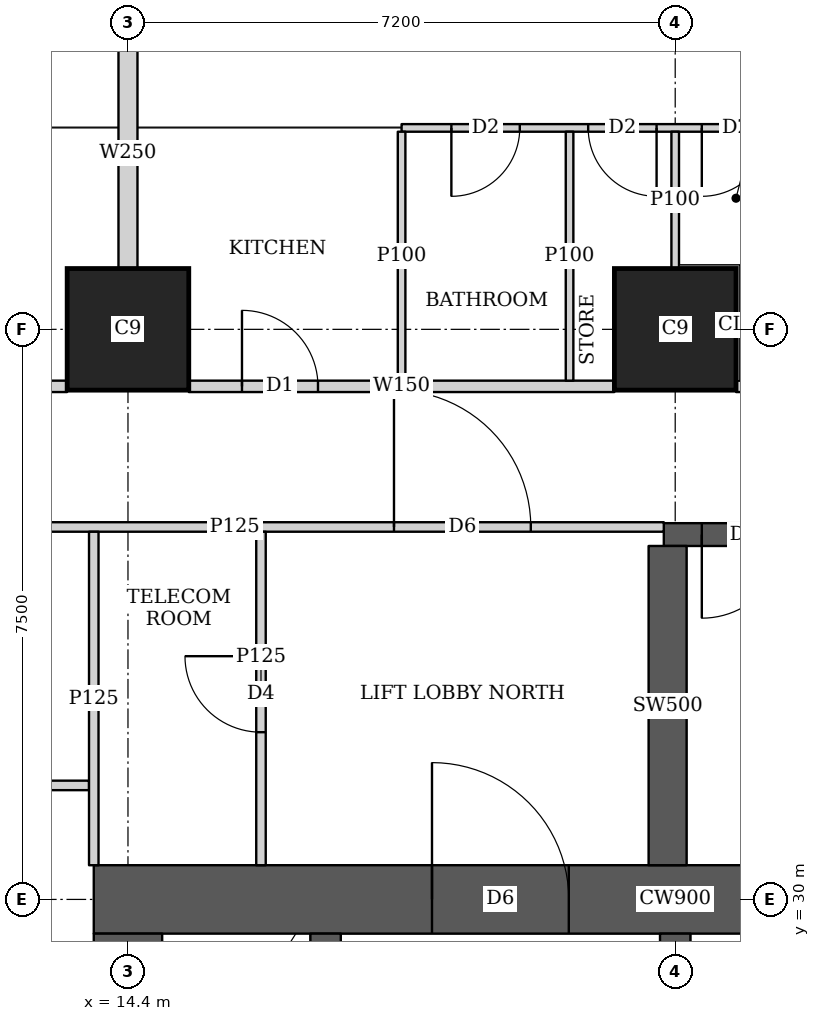
"""IFC4 building model, lengths in metres.
Left out: names, types, materials, properties, quantities, classifications, styles, units other than length and angle.
Written with IfcOpenShell. Run it as: python <this file> out.ifc"""

import sys

from ifc_helpers import new_model, si_unit, direction, frame, frame_2d, origin, origin_2d, place, context, subcontext, project, spatial, rectangle, extrude, element, fill, save


model = new_model("IFC4")
c1 = context("Model", 3, precision=1e-05, world=origin(), true_north=direction((0.0, 1.0)))
c2 = subcontext(c1, "Body", "Model", "MODEL_VIEW")
j1 = project(units=[si_unit("LENGTHUNIT", "METRE"), si_unit("PLANEANGLEUNIT", "RADIAN")], contexts=[c1])
p1 = place(None, origin())
s1 = spatial("IfcSite", under=j1, at=p1, CompositionType="ELEMENT")
p2 = place(p1, origin())
s2 = spatial("IfcBuilding", under=s1, at=p2, CompositionType="ELEMENT")
p3 = place(p2, frame((0.0, 0.0, 81.65)))
s3 = spatial("IfcBuildingStorey", under=s2, at=p3, CompositionType="ELEMENT", Elevation=81.65)
for number, where, z_axis, x_axis in (
    (1, (14.4, 37.5, 0.0), (0.0, 0.0, 1.0), (1.0, 0.0, 0.0)),
    (2, (21.6, 37.5, 0.0), (0.0, 0.0, 1.0), (1.0, 0.0, 0.0)),
):
    element("IfcColumn", number, at=place(p3, frame(where, z_axis=z_axis, x_axis=x_axis)), inside=s3, PredefinedType="COLUMN", context=c2, shape_type="SweptSolid", body=[
        extrude(rectangle(XDim=1.6, YDim=1.6, at=origin_2d()), origin(), (0.0, 0.0, 1.0), 3.75),
    ])
p4 = place(p3, frame((13.95, 30.0, 0.0), z_axis=(0.0, 0.0, 1.0), x_axis=(1.0, 0.0, 0.0)))
e3 = element("IfcWall", 3, at=p4, inside=s3, PredefinedType="SHEAR", context=c2, shape_type="SweptSolid", body=[
    extrude(rectangle(XDim=15.3, YDim=0.9, at=frame_2d((7.65, 0.0))), origin(), (0.0, 0.0, 1.0), 3.75),
])
p5 = place(p4, frame((4.45, 0.0, 0.0)))
e4 = element("IfcOpeningElement", 4, at=p5, cuts=e3, PredefinedType="OPENING", context=c2, shape_type="SweptSolid", body=[
    extrude(rectangle(XDim=1.8, YDim=2.1, at=frame_2d((0.9, 1.05))), frame((0.0, 0.46, 0.0), z_axis=(0.0, -1.0, 0.0), x_axis=(1.0, 0.0, 0.0)), (0.0, 0.0, 1.0), 0.92),
])
p6 = place(p4, frame((10.7, 0.0, 0.0)))
e5 = element("IfcOpeningElement", 5, at=p6, cuts=e3, PredefinedType="OPENING", context=c2, shape_type="SweptSolid", body=[
    extrude(rectangle(XDim=1.1, YDim=2.1, at=frame_2d((0.55, 1.05))), frame((0.0, 0.46, 0.0), z_axis=(0.0, -1.0, 0.0), x_axis=(1.0, 0.0, 0.0)), (0.0, 0.0, 1.0), 0.92),
])
p7 = place(p3, frame((14.4, 15.45, 0.0), z_axis=(0.0, 0.0, 1.0), x_axis=(0.0, 1.0, 0.0)))
e6 = element("IfcWall", 6, at=p7, inside=s3, PredefinedType="SHEAR", context=c2, shape_type="SweptSolid", body=[
    extrude(rectangle(XDim=14.1, YDim=0.9, at=frame_2d((7.05, 0.0))), origin(), (0.0, 0.0, 1.0), 3.75),
])
p8 = place(p3, frame((17.0, 15.45, 0.0), z_axis=(0.0, 0.0, 1.0), x_axis=(0.0, 1.0, 0.0)))
e7 = element("IfcWall", 7, at=p8, inside=s3, PredefinedType="SHEAR", context=c2, shape_type="SweptSolid", body=[
    extrude(rectangle(XDim=14.1, YDim=0.4, at=frame_2d((7.05, 0.0))), origin(), (0.0, 0.0, 1.0), 3.75),
])
p9 = place(p8, frame((0.875, 0.0, 0.0)))
e8 = element("IfcOpeningElement", 8, at=p9, cuts=e7, PredefinedType="OPENING", context=c2, shape_type="SweptSolid", body=[
    extrude(rectangle(XDim=1.1, YDim=2.1, at=frame_2d((0.55, 1.05))), frame((0.0, 0.21, 0.0), z_axis=(0.0, -1.0, 0.0), x_axis=(1.0, 0.0, 0.0)), (0.0, 0.0, 1.0), 0.42),
])
p10 = place(p8, frame((4.625, 0.0, 0.0)))
e9 = element("IfcOpeningElement", 9, at=p10, cuts=e7, PredefinedType="OPENING", context=c2, shape_type="SweptSolid", body=[
    extrude(rectangle(XDim=1.1, YDim=2.1, at=frame_2d((0.55, 1.05))), frame((0.0, 0.21, 0.0), z_axis=(0.0, -1.0, 0.0), x_axis=(1.0, 0.0, 0.0)), (0.0, 0.0, 1.0), 0.42),
])
p11 = place(p8, frame((8.375, 0.0, 0.0)))
e10 = element("IfcOpeningElement", 10, at=p11, cuts=e7, PredefinedType="OPENING", context=c2, shape_type="SweptSolid", body=[
    extrude(rectangle(XDim=1.1, YDim=2.1, at=frame_2d((0.55, 1.05))), frame((0.0, 0.21, 0.0), z_axis=(0.0, -1.0, 0.0), x_axis=(1.0, 0.0, 0.0)), (0.0, 0.0, 1.0), 0.42),
])
p12 = place(p8, frame((12.125, 0.0, 0.0)))
e11 = element("IfcOpeningElement", 11, at=p12, cuts=e7, PredefinedType="OPENING", context=c2, shape_type="SweptSolid", body=[
    extrude(rectangle(XDim=1.1, YDim=2.1, at=frame_2d((0.55, 1.05))), frame((0.0, 0.21, 0.0), z_axis=(0.0, -1.0, 0.0), x_axis=(1.0, 0.0, 0.0)), (0.0, 0.0, 1.0), 0.42),
])
p13 = place(p3, frame((21.6, 15.45, 0.0), z_axis=(0.0, 0.0, 1.0), x_axis=(0.0, 1.0, 0.0)))
e12 = element("IfcWall", 12, at=p13, inside=s3, PredefinedType="SHEAR", context=c2, shape_type="SweptSolid", body=[
    extrude(rectangle(XDim=14.1, YDim=0.4, at=frame_2d((7.05, 0.0))), origin(), (0.0, 0.0, 1.0), 3.75),
])
p14 = place(p3, frame((21.45, 34.8, 0.0), z_axis=(0.0, 0.0, 1.0), x_axis=(1.0, 0.0, 0.0)))
e13 = element("IfcWall", 13, at=p14, inside=s3, PredefinedType="SHEAR", context=c2, shape_type="SweptSolid", body=[
    extrude(rectangle(XDim=7.5, YDim=0.3, at=frame_2d((3.75, 0.0))), origin(), (0.0, 0.0, 1.0), 3.75),
])
p15 = place(p14, frame((0.5, 0.0, 0.0)))
e14 = element("IfcOpeningElement", 14, at=p15, cuts=e13, PredefinedType="OPENING", context=c2, shape_type="SweptSolid", body=[
    extrude(rectangle(XDim=1.1, YDim=2.1, at=frame_2d((0.55, 1.05))), frame((0.0, 0.16, 0.0), z_axis=(0.0, -1.0, 0.0), x_axis=(1.0, 0.0, 0.0)), (0.0, 0.0, 1.0), 0.32),
])
p16 = place(p3, frame((21.5, 30.45, 0.0), z_axis=(0.0, 0.0, 1.0), x_axis=(0.0, 1.0, 0.0)))
e15 = element("IfcWall", 15, at=p16, inside=s3, PredefinedType="SHEAR", context=c2, shape_type="SweptSolid", body=[
    extrude(rectangle(XDim=4.2, YDim=0.5, at=frame_2d((2.1, 0.0))), origin(), (0.0, 0.0, 1.0), 3.75),
])
p17 = place(p3, frame((8.1, 36.75, 0.0), z_axis=(0.0, 0.0, 1.0), x_axis=(1.0, 0.0, 0.0)))
e16 = element("IfcWall", 16, at=p17, inside=s3, PredefinedType="SOLIDWALL", context=c2, shape_type="SweptSolid", body=[
    extrude(rectangle(XDim=5.499, YDim=0.15, at=frame_2d((2.75, 0.0))), origin(), (0.0, 0.0, 1.0), 3.5),
])
p18 = place(p17, frame((3.739, 0.0, 0.0)))
e17 = element("IfcOpeningElement", 17, at=p18, cuts=e16, PredefinedType="OPENING", context=c2, shape_type="SweptSolid", body=[
    extrude(rectangle(XDim=1.0, YDim=2.1, at=frame_2d((0.5, 1.05))), frame((0.0, 0.085, 0.0), z_axis=(0.0, -1.0, 0.0), x_axis=(1.0, 0.0, 0.0)), (0.0, 0.0, 1.0), 0.17),
])
p19 = place(p3, frame((15.201, 36.75, 0.0), z_axis=(0.0, 0.0, 1.0), x_axis=(1.0, 0.0, 0.0)))
e18 = element("IfcWall", 18, at=p19, inside=s3, PredefinedType="SOLIDWALL", context=c2, shape_type="SweptSolid", body=[
    extrude(rectangle(XDim=5.598, YDim=0.15, at=frame_2d((2.799, 0.0))), origin(), (0.0, 0.0, 1.0), 3.5),
])
p20 = place(p19, frame((0.699, 0.0, 0.0)))
e19 = element("IfcOpeningElement", 19, at=p20, cuts=e18, PredefinedType="OPENING", context=c2, shape_type="SweptSolid", body=[
    extrude(rectangle(XDim=1.0, YDim=2.1, at=frame_2d((0.5, 1.05))), frame((0.0, 0.085, 0.0), z_axis=(0.0, -1.0, 0.0), x_axis=(1.0, 0.0, 0.0)), (0.0, 0.0, 1.0), 0.17),
])
p21 = place(p3, frame((22.401, 36.75, 0.0), z_axis=(0.0, 0.0, 1.0), x_axis=(1.0, 0.0, 0.0)))
e20 = element("IfcWall", 20, at=p21, inside=s3, PredefinedType="SOLIDWALL", context=c2, shape_type="SweptSolid", body=[
    extrude(rectangle(XDim=5.598, YDim=0.15, at=frame_2d((2.799, 0.0))), origin(), (0.0, 0.0, 1.0), 3.5),
])
p22 = place(p3, frame((18.0, 40.15, 0.0), z_axis=(0.0, 0.0, 1.0), x_axis=(1.0, 0.0, 0.0)))
e21 = element("IfcWall", 21, at=p22, inside=s3, PredefinedType="PARTITIONING", context=c2, shape_type="SweptSolid", body=[
    extrude(rectangle(XDim=10.675, YDim=0.1, at=frame_2d((5.337, 0.0))), origin(), (0.0, 0.0, 1.0), 3.5),
])
p23 = place(p22, frame((0.655, 0.0, 0.0)))
e22 = element("IfcOpeningElement", 22, at=p23, cuts=e21, PredefinedType="OPENING", context=c2, shape_type="SweptSolid", body=[
    extrude(rectangle(XDim=0.9, YDim=2.1, at=frame_2d((0.45, 1.05))), frame((0.0, 0.06, 0.0), z_axis=(0.0, -1.0, 0.0), x_axis=(1.0, 0.0, 0.0)), (0.0, 0.0, 1.0), 0.12),
])
p24 = place(p22, frame((3.95, 0.0, 0.0)))
e23 = element("IfcOpeningElement", 23, at=p24, cuts=e21, PredefinedType="OPENING", context=c2, shape_type="SweptSolid", body=[
    extrude(rectangle(XDim=0.9, YDim=2.1, at=frame_2d((0.45, 1.05))), frame((0.0, 0.06, 0.0), z_axis=(0.0, -1.0, 0.0), x_axis=(1.0, 0.0, 0.0)), (0.0, 0.0, 1.0), 0.12),
])
p25 = place(p22, frame((7.66, 0.0, 0.0)))
e24 = element("IfcOpeningElement", 24, at=p25, cuts=e21, PredefinedType="OPENING", context=c2, shape_type="SweptSolid", body=[
    extrude(rectangle(XDim=0.9, YDim=2.1, at=frame_2d((0.45, 1.05))), frame((0.0, 0.06, 0.0), z_axis=(0.0, -1.0, 0.0), x_axis=(1.0, 0.0, 0.0)), (0.0, 0.0, 1.0), 0.12),
])
p26 = place(p22, frame((2.455, 0.0, 0.0)))
e25 = element("IfcOpeningElement", 25, at=p26, cuts=e21, PredefinedType="OPENING", context=c2, shape_type="SweptSolid", body=[
    extrude(rectangle(XDim=0.9, YDim=2.1, at=frame_2d((0.45, 1.05))), frame((0.0, 0.06, 0.0), z_axis=(0.0, -1.0, 0.0), x_axis=(1.0, 0.0, 0.0)), (0.0, 0.0, 1.0), 0.12),
])
p27 = place(p22, frame((5.75, 0.0, 0.0)))
e26 = element("IfcOpeningElement", 26, at=p27, cuts=e21, PredefinedType="OPENING", context=c2, shape_type="SweptSolid", body=[
    extrude(rectangle(XDim=0.9, YDim=2.1, at=frame_2d((0.45, 1.05))), frame((0.0, 0.06, 0.0), z_axis=(0.0, -1.0, 0.0), x_axis=(1.0, 0.0, 0.0)), (0.0, 0.0, 1.0), 0.12),
])
p28 = place(p22, frame((9.46, 0.0, 0.0)))
e27 = element("IfcOpeningElement", 27, at=p28, cuts=e21, PredefinedType="OPENING", context=c2, shape_type="SweptSolid", body=[
    extrude(rectangle(XDim=0.9, YDim=2.1, at=frame_2d((0.45, 1.05))), frame((0.0, 0.06, 0.0), z_axis=(0.0, -1.0, 0.0), x_axis=(1.0, 0.0, 0.0)), (0.0, 0.0, 1.0), 0.12),
])
p29 = place(p3, frame((18.0, 36.825, 0.0), z_axis=(0.0, 0.0, 1.0), x_axis=(0.0, 1.0, 0.0)))
e28 = element("IfcWall", 28, at=p29, inside=s3, PredefinedType="PARTITIONING", context=c2, shape_type="SweptSolid", body=[
    extrude(rectangle(XDim=3.275, YDim=0.1, at=frame_2d((1.638, 0.0))), origin(), (0.0, 0.0, 1.0), 3.5),
])
p30 = place(p3, frame((21.6, 38.301, 0.0), z_axis=(0.0, 0.0, 1.0), x_axis=(0.0, 1.0, 0.0)))
e29 = element("IfcWall", 29, at=p30, inside=s3, PredefinedType="PARTITIONING", context=c2, shape_type="SweptSolid", body=[
    extrude(rectangle(XDim=1.799, YDim=0.1, at=frame_2d((0.899, 0.0))), origin(), (0.0, 0.0, 1.0), 3.5),
])
p31 = place(p3, frame((20.21, 36.825, 0.0), z_axis=(0.0, 0.0, 1.0), x_axis=(0.0, 1.0, 0.0)))
e30 = element("IfcWall", 30, at=p31, inside=s3, PredefinedType="PARTITIONING", context=c2, shape_type="SweptSolid", body=[
    extrude(rectangle(XDim=3.275, YDim=0.1, at=frame_2d((1.638, 0.0))), origin(), (0.0, 0.0, 1.0), 3.5),
])
p32 = place(p3, frame((14.4, 38.301, 0.0), z_axis=(0.0, 0.0, 1.0), x_axis=(0.0, 1.0, 0.0)))
e31 = element("IfcWall", 31, at=p32, inside=s3, PredefinedType="SOLIDWALL", context=c2, shape_type="SweptSolid", body=[
    extrude(rectangle(XDim=3.049, YDim=0.25, at=frame_2d((1.524, 0.0))), origin(), (0.0, 0.0, 1.0), 3.5),
])
p33 = place(p3, frame((10.163, 31.5, 0.0), z_axis=(0.0, 0.0, 1.0), x_axis=(1.0, 0.0, 0.0)))
e32 = element("IfcWall", 32, at=p33, inside=s3, PredefinedType="PARTITIONING", context=c2, shape_type="SweptSolid", body=[
    extrude(rectangle(XDim=3.725, YDim=0.125, at=frame_2d((1.862, 0.0))), origin(), (0.0, 0.0, 1.0), 3.5),
])
p34 = place(p3, frame((13.95, 30.45, 0.0), z_axis=(0.0, 0.0, 1.0), x_axis=(0.0, 1.0, 0.0)))
e33 = element("IfcWall", 33, at=p34, inside=s3, PredefinedType="PARTITIONING", context=c2, shape_type="SweptSolid", body=[
    extrude(rectangle(XDim=4.387, YDim=0.125, at=frame_2d((2.193, 0.0))), origin(), (0.0, 0.0, 1.0), 3.5),
])
p35 = place(p3, frame((10.163, 34.9, 0.0), z_axis=(0.0, 0.0, 1.0), x_axis=(1.0, 0.0, 0.0)))
e34 = element("IfcWall", 34, at=p35, inside=s3, PredefinedType="PARTITIONING", context=c2, shape_type="SweptSolid", body=[
    extrude(rectangle(XDim=11.287, YDim=0.125, at=frame_2d((5.644, 0.0))), origin(), (0.0, 0.0, 1.0), 3.5),
])
p36 = place(p35, frame((7.737, 0.0, 0.0)))
e35 = element("IfcOpeningElement", 35, at=p36, cuts=e34, PredefinedType="OPENING", context=c2, shape_type="SweptSolid", body=[
    extrude(rectangle(XDim=1.8, YDim=2.1, at=frame_2d((0.9, 1.05))), frame((0.0, 0.073, 0.0), z_axis=(0.0, -1.0, 0.0), x_axis=(1.0, 0.0, 0.0)), (0.0, 0.0, 1.0), 0.145),
])
p37 = place(p3, frame((16.15, 30.45, 0.0), z_axis=(0.0, 0.0, 1.0), x_axis=(0.0, 1.0, 0.0)))
e36 = element("IfcWall", 36, at=p37, inside=s3, PredefinedType="PARTITIONING", context=c2, shape_type="SweptSolid", body=[
    extrude(rectangle(XDim=4.387, YDim=0.125, at=frame_2d((2.193, 0.0))), origin(), (0.0, 0.0, 1.0), 3.5),
])
p38 = place(p37, frame((1.75, 0.0, 0.0)))
e37 = element("IfcOpeningElement", 37, at=p38, cuts=e36, PredefinedType="OPENING", context=c2, shape_type="SweptSolid", body=[
    extrude(rectangle(XDim=1.0, YDim=2.1, at=frame_2d((0.5, 1.05))), frame((0.0, 0.073, 0.0), z_axis=(0.0, -1.0, 0.0), x_axis=(1.0, 0.0, 0.0)), (0.0, 0.0, 1.0), 0.145),
])
p39 = place(p23, origin())
e38 = element("IfcDoor", 38, at=p39, inside=s3, OperationType="SINGLE_SWING_RIGHT", PredefinedType="DOOR", context=c2, shape_type="SweptSolid", body=[
    extrude(rectangle(XDim=0.9, YDim=2.1, at=frame_2d((0.45, 1.05))), frame((0.0, 0.025, 0.0), z_axis=(0.0, -1.0, 0.0), x_axis=(1.0, 0.0, 0.0)), (0.0, 0.0, 1.0), 0.05),
])
fill(e22, e38)
p40 = place(p24, origin())
e39 = element("IfcDoor", 39, at=p40, inside=s3, OperationType="SINGLE_SWING_RIGHT", PredefinedType="DOOR", context=c2, shape_type="SweptSolid", body=[
    extrude(rectangle(XDim=0.9, YDim=2.1, at=frame_2d((0.45, 1.05))), frame((0.0, 0.025, 0.0), z_axis=(0.0, -1.0, 0.0), x_axis=(1.0, 0.0, 0.0)), (0.0, 0.0, 1.0), 0.05),
])
fill(e23, e39)
p41 = place(p26, origin())
e40 = element("IfcDoor", 40, at=p41, inside=s3, OperationType="SINGLE_SWING_LEFT", PredefinedType="DOOR", context=c2, shape_type="SweptSolid", body=[
    extrude(rectangle(XDim=0.9, YDim=2.1, at=frame_2d((0.45, 1.05))), frame((0.0, 0.025, 0.0), z_axis=(0.0, -1.0, 0.0), x_axis=(1.0, 0.0, 0.0)), (0.0, 0.0, 1.0), 0.05),
])
fill(e25, e40)
p42 = place(p20, origin())
e41 = element("IfcDoor", 41, at=p42, inside=s3, OperationType="SINGLE_SWING_LEFT", PredefinedType="DOOR", context=c2, shape_type="SweptSolid", body=[
    extrude(rectangle(XDim=1.0, YDim=2.1, at=frame_2d((0.5, 1.05))), frame((0.0, 0.025, 0.0), z_axis=(0.0, -1.0, 0.0), x_axis=(1.0, 0.0, 0.0)), (0.0, 0.0, 1.0), 0.05),
])
fill(e19, e41)
p43 = place(p38, origin())
e42 = element("IfcDoor", 42, at=p43, inside=s3, OperationType="SINGLE_SWING_RIGHT", PredefinedType="DOOR", context=c2, shape_type="SweptSolid", body=[
    extrude(rectangle(XDim=1.0, YDim=2.1, at=frame_2d((0.5, 1.05))), frame((0.0, 0.025, 0.0), z_axis=(0.0, -1.0, 0.0), x_axis=(1.0, 0.0, 0.0)), (0.0, 0.0, 1.0), 0.05),
])
fill(e37, e42)
p44 = place(p36, origin())
e43 = element("IfcDoor", 43, at=p44, inside=s3, OperationType="DOUBLE_DOOR_SINGLE_SWING", PredefinedType="DOOR", context=c2, shape_type="SweptSolid", body=[
    extrude(rectangle(XDim=1.8, YDim=2.1, at=frame_2d((0.9, 1.05))), frame((0.0, 0.025, 0.0), z_axis=(0.0, -1.0, 0.0), x_axis=(1.0, 0.0, 0.0)), (0.0, 0.0, 1.0), 0.05),
])
fill(e35, e43)
p45 = place(p5, origin())
e44 = element("IfcDoor", 44, at=p45, inside=s3, OperationType="DOUBLE_DOOR_SINGLE_SWING", PredefinedType="DOOR", context=c2, shape_type="SweptSolid", body=[
    extrude(rectangle(XDim=1.8, YDim=2.1, at=frame_2d((0.9, 1.05))), frame((0.0, 0.025, 0.0), z_axis=(0.0, -1.0, 0.0), x_axis=(1.0, 0.0, 0.0)), (0.0, 0.0, 1.0), 0.05),
])
fill(e4, e44)
p46 = place(p15, origin())
e45 = element("IfcDoor", 45, at=p46, inside=s3, OperationType="SINGLE_SWING_RIGHT", PredefinedType="DOOR", context=c2, shape_type="SweptSolid", body=[
    extrude(rectangle(XDim=1.1, YDim=2.1, at=frame_2d((0.55, 1.05))), frame((0.0, 0.025, 0.0), z_axis=(0.0, -1.0, 0.0), x_axis=(1.0, 0.0, 0.0)), (0.0, 0.0, 1.0), 0.05),
])
fill(e14, e45)
save(model, sys.argv[1])
